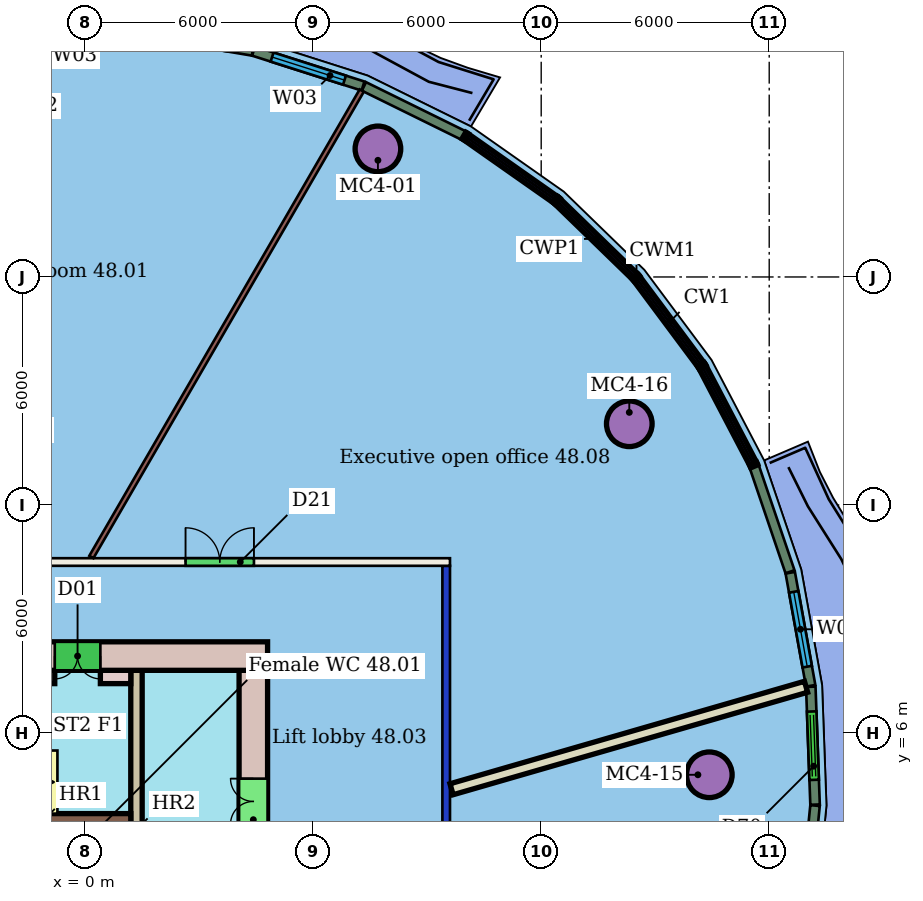
"""IFC4 building model, lengths in metres.
Left out: names, types, materials, properties, quantities, classifications, styles, units other than length and angle.
Written with IfcOpenShell. Run it as: python <this file> out.ifc"""

import sys

from ifc_helpers import new_model, si_unit, direction, frame, frame_2d, origin, origin_2d, place, context, subcontext, project, spatial, rectangle, hollow_circle, extrude, element, fill, save


model = new_model("IFC4")
c1 = context("Model", 3, precision=1e-05, world=origin(), true_north=direction((0.0, 1.0)))
c2 = subcontext(c1, "Body", "Model", "MODEL_VIEW")
j1 = project(units=[si_unit("LENGTHUNIT", "METRE"), si_unit("PLANEANGLEUNIT", "RADIAN")], contexts=[c1])
p1 = place(None, origin())
s1 = spatial("IfcSite", under=j1, at=p1, CompositionType="ELEMENT")
p2 = place(p1, origin())
s2 = spatial("IfcBuilding", under=s1, at=p2, CompositionType="ELEMENT")
p3 = place(p2, frame((0.0, 0.0, 199.3)))
s3 = spatial("IfcBuildingStorey", under=s2, at=p3, CompositionType="ELEMENT", Elevation=199.3)
for number, where, z_axis, x_axis in (
    (1, (7.704, 21.37, 0.0), (0.0, 0.0, 1.0), (1.0, 0.0, 0.0)),
    (2, (16.424, 4.901, 0.0), (0.0, 0.0, 1.0), (1.0, 0.0, 0.0)),
    (3, (14.318, 14.137, 0.0), (0.0, 0.0, 1.0), (1.0, 0.0, 0.0)),
):
    element("IfcColumn", number, at=place(p3, frame(where, z_axis=z_axis, x_axis=x_axis)), inside=s3, PredefinedType="COLUMN", context=c2, shape_type="SweptSolid", body=[
        extrude(hollow_circle(Radius=0.6, WallThickness=0.045, at=origin_2d()), origin(), (0.0, 0.0, 1.0), 3.45),
    ])
p4 = place(p3, frame((-21.6, 10.5, 0.0), z_axis=(0.0, 0.0, 1.0), x_axis=(1.0, 0.0, 0.0)))
e4 = element("IfcWall", 4, at=p4, inside=s3, PredefinedType="PARTITIONING", context=c2, shape_type="SweptSolid", body=[
    extrude(rectangle(XDim=31.2, YDim=0.2, at=frame_2d((15.6, 0.0))), origin(), (0.0, 0.0, 1.0), 3.45),
])
p5 = place(p4, frame((18.321, 0.0, 0.0)))
e5 = element("IfcOpeningElement", 5, at=p5, cuts=e4, PredefinedType="OPENING", context=c2, shape_type="SweptSolid", body=[
    extrude(rectangle(XDim=1.5, YDim=2.1, at=frame_2d((0.75, 1.05))), frame((0.0, 0.11, 0.0), z_axis=(0.0, -1.0, 0.0), x_axis=(1.0, 0.0, 0.0)), (0.0, 0.0, 1.0), 0.22),
])
p6 = place(p4, frame((8.688, 0.0, 0.0)))
e6 = element("IfcOpeningElement", 6, at=p6, cuts=e4, PredefinedType="OPENING", context=c2, shape_type="SweptSolid", body=[
    extrude(rectangle(XDim=1.8, YDim=2.4, at=frame_2d((0.9, 1.2))), frame((0.0, 0.11, 0.0), z_axis=(0.0, -1.0, 0.0), x_axis=(1.0, 0.0, 0.0)), (0.0, 0.0, 1.0), 0.22),
])
p7 = place(p4, frame((24.241, 0.0, 0.0)))
e7 = element("IfcOpeningElement", 7, at=p7, cuts=e4, PredefinedType="OPENING", context=c2, shape_type="SweptSolid", body=[
    extrude(rectangle(XDim=1.8, YDim=2.1, at=frame_2d((0.9, 1.05))), frame((0.0, 0.11, 0.0), z_axis=(0.0, -1.0, 0.0), x_axis=(1.0, 0.0, 0.0)), (0.0, 0.0, 1.0), 0.22),
])
p8 = place(p3, frame((9.5, 10.4, 0.0), z_axis=(0.0, 0.0, 1.0), x_axis=(0.0, -1.0, 0.0)))
e8 = element("IfcWall", 8, at=p8, inside=s3, PredefinedType="PARTITIONING", context=c2, shape_type="SweptSolid", body=[
    extrude(rectangle(XDim=20.8, YDim=0.2, at=frame_2d((10.4, 0.0))), origin(), (0.0, 0.0, 1.0), 3.05),
])
p9 = place(p8, frame((10.084, 0.0, 0.0)))
e9 = element("IfcOpeningElement", 9, at=p9, cuts=e8, PredefinedType="OPENING", context=c2, shape_type="SweptSolid", body=[
    extrude(rectangle(XDim=1.8, YDim=2.4, at=frame_2d((0.9, 1.2))), frame((0.0, 0.11, 0.0), z_axis=(0.0, -1.0, 0.0), x_axis=(1.0, 0.0, 0.0)), (0.0, 0.0, 1.0), 0.22),
])
p10 = place(p3, frame((7.277, 22.904, 0.0), z_axis=(0.0, 0.0, 1.0), x_axis=(-0.501519234172, -0.865146494968, 0.0)))
e10 = element("IfcWall", 10, at=p10, inside=s3, PredefinedType="PARTITIONING", context=c2, shape_type="SweptSolid", body=[
    extrude(rectangle(XDim=14.185, YDim=0.125, at=frame_2d((7.093, 0.0))), origin(), (0.0, 0.0, 1.0), 3.45),
])
p11 = place(p3, frame((18.969, 7.217, 0.0), z_axis=(0.0, 0.0, 1.0), x_axis=(-0.960680652431, -0.277655693342, 0.0)))
e11 = element("IfcWall", 11, at=p11, inside=s3, PredefinedType="PARTITIONING", context=c2, shape_type="SweptSolid", body=[
    extrude(rectangle(XDim=9.709, YDim=0.3, at=frame_2d((4.854, 0.0))), origin(), (0.0, 0.0, 1.0), 3.45),
])
p12 = place(p3, frame((9.951, 21.726, 0.0), z_axis=(0.0, 0.0, 1.0), x_axis=(-0.897141057634, 0.441744182426, 0.0)))
e12 = element("IfcWall", 12, at=p12, inside=s3, PredefinedType="SOLIDWALL", context=c2, shape_type="SweptSolid", body=[
    extrude(rectangle(XDim=2.915, YDim=0.25, at=frame_2d((1.458, 0.0))), origin(), (0.0, 0.0, 1.0), 3.1),
])
p13 = place(p3, frame((7.311, 23.024, 0.0), z_axis=(0.0, 0.0, 1.0), x_axis=(-0.952776106235, 0.303673659358, 0.0)))
e13 = element("IfcWall", 13, at=p13, inside=s3, PredefinedType="SOLIDWALL", context=c2, shape_type="SweptSolid", body=[
    extrude(rectangle(XDim=3.023, YDim=0.25, at=frame_2d((1.511, 0.0))), origin(), (0.0, 0.0, 1.0), 3.1),
])
p14 = place(p13, frame((0.511, 0.0, 0.9)))
e14 = element("IfcOpeningElement", 14, at=p14, cuts=e13, PredefinedType="OPENING", context=c2, shape_type="SweptSolid", body=[
    extrude(rectangle(XDim=2.0, YDim=2.1, at=frame_2d((1.0, 1.05))), frame((0.0, 0.135, 0.0), z_axis=(0.0, -1.0, 0.0), x_axis=(1.0, 0.0, 0.0)), (0.0, 0.0, 1.0), 0.27),
])
p15 = place(p3, frame((4.406, 23.948, 0.0), z_axis=(0.0, 0.0, 1.0), x_axis=(-0.986216863641, 0.165457843178, 0.0)))
e15 = element("IfcWall", 15, at=p15, inside=s3, PredefinedType="SOLIDWALL", context=c2, shape_type="SweptSolid", body=[
    extrude(rectangle(XDim=3.103, YDim=0.25, at=frame_2d((1.552, 0.0))), origin(), (0.0, 0.0, 1.0), 3.1),
])
p16 = place(p15, frame((0.652, 0.0, 0.0)))
e16 = element("IfcOpeningElement", 16, at=p16, cuts=e15, PredefinedType="OPENING", context=c2, shape_type="SweptSolid", body=[
    extrude(rectangle(XDim=1.8, YDim=2.4, at=frame_2d((0.9, 1.2))), frame((0.0, 0.135, 0.0), z_axis=(0.0, -1.0, 0.0), x_axis=(1.0, 0.0, 0.0)), (0.0, 0.0, 1.0), 0.27),
])
p17 = place(p3, frame((18.891, 0.917, 0.0), z_axis=(0.0, 0.0, 1.0), x_axis=(0.09873075653, 0.995114183255, 0.0)))
e17 = element("IfcWall", 17, at=p17, inside=s3, PredefinedType="SOLIDWALL", context=c2, shape_type="SweptSolid", body=[
    extrude(rectangle(XDim=3.19, YDim=0.25, at=frame_2d((1.595, 0.0))), origin(), (0.0, 0.0, 1.0), 3.1),
])
p18 = place(p17, frame((0.595, 0.0, 0.9)))
e18 = element("IfcOpeningElement", 18, at=p18, cuts=e17, PredefinedType="OPENING", context=c2, shape_type="SweptSolid", body=[
    extrude(rectangle(XDim=2.0, YDim=2.1, at=frame_2d((1.0, 1.05))), frame((0.0, 0.135, 0.0), z_axis=(0.0, -1.0, 0.0), x_axis=(1.0, 0.0, 0.0)), (0.0, 0.0, 1.0), 0.27),
])
p19 = place(p3, frame((19.207, 4.116, 0.0), z_axis=(0.0, 0.0, 1.0), x_axis=(-0.036429625248, 0.999336220901, 0.0)))
e19 = element("IfcWall", 19, at=p19, inside=s3, PredefinedType="SOLIDWALL", context=c2, shape_type="SweptSolid", body=[
    extrude(rectangle(XDim=3.103, YDim=0.25, at=frame_2d((1.551, 0.0))), origin(), (0.0, 0.0, 1.0), 3.1),
])
p20 = place(p19, frame((0.652, 0.0, 0.0)))
e20 = element("IfcOpeningElement", 20, at=p20, cuts=e19, PredefinedType="OPENING", context=c2, shape_type="SweptSolid", body=[
    extrude(rectangle(XDim=1.8, YDim=2.4, at=frame_2d((0.9, 1.2))), frame((0.0, 0.135, 0.0), z_axis=(0.0, -1.0, 0.0), x_axis=(1.0, 0.0, 0.0)), (0.0, 0.0, 1.0), 0.27),
])
p21 = place(p3, frame((19.091, 7.243, 0.0), z_axis=(0.0, 0.0, 1.0), x_axis=(-0.177755310082, 0.984074717558, 0.0)))
e21 = element("IfcWall", 21, at=p21, inside=s3, PredefinedType="SOLIDWALL", context=c2, shape_type="SweptSolid", body=[
    extrude(rectangle(XDim=3.023, YDim=0.25, at=frame_2d((1.511, 0.0))), origin(), (0.0, 0.0, 1.0), 3.1),
])
p22 = place(p21, frame((0.511, 0.0, 0.9)))
e22 = element("IfcOpeningElement", 22, at=p22, cuts=e21, PredefinedType="OPENING", context=c2, shape_type="SweptSolid", body=[
    extrude(rectangle(XDim=2.0, YDim=2.1, at=frame_2d((1.0, 1.05))), frame((0.0, 0.135, 0.0), z_axis=(0.0, -1.0, 0.0), x_axis=(1.0, 0.0, 0.0)), (0.0, 0.0, 1.0), 0.27),
])
p23 = place(p3, frame((18.547, 10.243, 0.0), z_axis=(0.0, 0.0, 1.0), x_axis=(-0.321901231571, 0.946773255385, 0.0)))
e23 = element("IfcWall", 23, at=p23, inside=s3, PredefinedType="SOLIDWALL", context=c2, shape_type="SweptSolid", body=[
    extrude(rectangle(XDim=2.915, YDim=0.25, at=frame_2d((1.457, 0.0))), origin(), (0.0, 0.0, 1.0), 3.1),
])
p24 = place(p3, frame((4.8, 8.025, 0.0), z_axis=(0.0, 0.0, 1.0), x_axis=(-1.0, 0.0, 0.0)))
e24 = element("IfcWall", 24, at=p24, inside=s3, PredefinedType="SHEAR", context=c2, shape_type="SweptSolid", body=[
    extrude(rectangle(XDim=10.8, YDim=0.75, at=frame_2d((5.4, 0.0))), origin(), (0.0, 0.0, 1.0), 3.3),
])
p25 = place(p24, frame((4.4, 0.0, 0.0)))
e25 = element("IfcOpeningElement", 25, at=p25, cuts=e24, PredefinedType="OPENING", context=c2, shape_type="SweptSolid", body=[
    extrude(rectangle(XDim=1.2, YDim=2.1, at=frame_2d((0.6, 1.05))), frame((0.0, 0.385, 0.0), z_axis=(0.0, -1.0, 0.0), x_axis=(1.0, 0.0, 0.0)), (0.0, 0.0, 1.0), 0.77),
])
p26 = place(p3, frame((4.425, -7.65, 0.0), z_axis=(0.0, 0.0, 1.0), x_axis=(0.0, 1.0, 0.0)))
e26 = element("IfcWall", 26, at=p26, inside=s3, PredefinedType="SHEAR", context=c2, shape_type="SweptSolid", body=[
    extrude(rectangle(XDim=15.3, YDim=0.75, at=frame_2d((7.65, 0.0))), origin(), (0.0, 0.0, 1.0), 3.3),
])
p27 = place(p26, frame((2.85, 0.0, 0.0)))
e27 = element("IfcOpeningElement", 27, at=p27, cuts=e26, PredefinedType="OPENING", context=c2, shape_type="SweptSolid", body=[
    extrude(rectangle(XDim=1.2, YDim=2.1, at=frame_2d((0.6, 1.05))), frame((0.0, 0.385, 0.0), z_axis=(0.0, -1.0, 0.0), x_axis=(1.0, 0.0, 0.0)), (0.0, 0.0, 1.0), 0.77),
])
p28 = place(p26, frame((11.25, 0.0, 0.0)))
e28 = element("IfcOpeningElement", 28, at=p28, cuts=e26, PredefinedType="OPENING", context=c2, shape_type="SweptSolid", body=[
    extrude(rectangle(XDim=1.2, YDim=2.1, at=frame_2d((0.6, 1.05))), frame((0.0, 0.385, 0.0), z_axis=(0.0, -1.0, 0.0), x_axis=(1.0, 0.0, 0.0)), (0.0, 0.0, 1.0), 0.77),
])
p29 = place(p3, frame((-6.0, 3.655, 0.0), z_axis=(0.0, 0.0, 1.0), x_axis=(1.0, 0.0, 0.0)))
e29 = element("IfcWall", 29, at=p29, inside=s3, PredefinedType="SHEAR", context=c2, shape_type="SweptSolid", body=[
    extrude(rectangle(XDim=7.2, YDim=0.45, at=frame_2d((3.6, 0.0))), origin(), (0.0, 0.0, 1.0), 3.3),
])
p30 = place(p3, frame((1.35, -7.65, 0.0), z_axis=(0.0, 0.0, 1.0), x_axis=(0.0, 1.0, 0.0)))
e30 = element("IfcWall", 30, at=p30, inside=s3, PredefinedType="SHEAR", context=c2, shape_type="SweptSolid", body=[
    extrude(rectangle(XDim=15.3, YDim=0.3, at=frame_2d((7.65, 0.0))), origin(), (0.0, 0.0, 1.0), 3.3),
])
p31 = place(p30, frame((1.56, 0.0, 0.0)))
e31 = element("IfcOpeningElement", 31, at=p31, cuts=e30, PredefinedType="OPENING", context=c2, shape_type="SweptSolid", body=[
    extrude(rectangle(XDim=1.0, YDim=2.1, at=frame_2d((0.5, 1.05))), frame((0.0, 0.16, 0.0), z_axis=(0.0, -1.0, 0.0), x_axis=(1.0, 0.0, 0.0)), (0.0, 0.0, 1.0), 0.32),
])
p32 = place(p30, frame((6.9, 0.0, 0.0)))
e32 = element("IfcOpeningElement", 32, at=p32, cuts=e30, PredefinedType="OPENING", context=c2, shape_type="SweptSolid", body=[
    extrude(rectangle(XDim=1.5, YDim=2.1, at=frame_2d((0.75, 1.05))), frame((0.0, 0.16, 0.0), z_axis=(0.0, -1.0, 0.0), x_axis=(1.0, 0.0, 0.0)), (0.0, 0.0, 1.0), 0.32),
])
p33 = place(p3, frame((-5.85, 7.475, 0.0), z_axis=(0.0, 0.0, 1.0), x_axis=(1.0, 0.0, 0.0)))
e33 = element("IfcWall", 33, at=p33, inside=s3, PredefinedType="SHEAR", context=c2, shape_type="SweptSolid", body=[
    extrude(rectangle(XDim=5.05, YDim=0.35, at=frame_2d((2.525, 0.0))), origin(), (0.0, 0.0, 1.0), 3.3),
])
p34 = place(p3, frame((0.4, 7.475, 0.0), z_axis=(0.0, 0.0, 1.0), x_axis=(1.0, 0.0, 0.0)))
e34 = element("IfcWall", 34, at=p34, inside=s3, PredefinedType="SHEAR", context=c2, shape_type="SweptSolid", body=[
    extrude(rectangle(XDim=0.8, YDim=0.35, at=frame_2d((0.4, 0.0))), origin(), (0.0, 0.0, 1.0), 3.3),
])
p35 = place(p7, origin())
e35 = element("IfcDoor", 35, at=p35, inside=s3, OperationType="DOUBLE_DOOR_SINGLE_SWING", PredefinedType="DOOR", context=c2, shape_type="SweptSolid", body=[
    extrude(rectangle(XDim=1.8, YDim=2.1, at=frame_2d((0.9, 1.05))), frame((0.0, 0.025, 0.0), z_axis=(0.0, -1.0, 0.0), x_axis=(1.0, 0.0, 0.0)), (0.0, 0.0, 1.0), 0.05),
])
fill(e7, e35)
p36 = place(p14, origin())
e36 = element("IfcWindow", 36, at=p36, inside=s3, PartitioningType="SINGLE_PANEL", PredefinedType="WINDOW", context=c2, shape_type="SweptSolid", body=[
    extrude(rectangle(XDim=2.0, YDim=2.1, at=frame_2d((1.0, 1.05))), frame((0.0, 0.03, 0.0), z_axis=(0.0, -1.0, 0.0), x_axis=(1.0, 0.0, 0.0)), (0.0, 0.0, 1.0), 0.06),
])
fill(e14, e36)
p37 = place(p20, origin())
e37 = element("IfcDoor", 37, at=p37, inside=s3, OperationType="DOUBLE_DOOR_SLIDING", PredefinedType="DOOR", context=c2, shape_type="SweptSolid", body=[
    extrude(rectangle(XDim=1.8, YDim=2.4, at=frame_2d((0.9, 1.2))), frame((0.0, 0.025, 0.0), z_axis=(0.0, -1.0, 0.0), x_axis=(1.0, 0.0, 0.0)), (0.0, 0.0, 1.0), 0.05),
])
fill(e20, e37)
p38 = place(p22, origin())
e38 = element("IfcWindow", 38, at=p38, inside=s3, PartitioningType="SINGLE_PANEL", PredefinedType="WINDOW", context=c2, shape_type="SweptSolid", body=[
    extrude(rectangle(XDim=2.0, YDim=2.1, at=frame_2d((1.0, 1.05))), frame((0.0, 0.03, 0.0), z_axis=(0.0, -1.0, 0.0), x_axis=(1.0, 0.0, 0.0)), (0.0, 0.0, 1.0), 0.06),
])
fill(e22, e38)
p39 = place(p25, origin())
e39 = element("IfcDoor", 39, at=p39, inside=s3, OperationType="DOUBLE_DOOR_SINGLE_SWING", PredefinedType="NOTDEFINED", context=c2, shape_type="SweptSolid", body=[
    extrude(rectangle(XDim=1.2, YDim=2.1, at=frame_2d((0.6, 1.05))), frame((0.0, 0.025, 0.0), z_axis=(0.0, -1.0, 0.0), x_axis=(1.0, 0.0, 0.0)), (0.0, 0.0, 1.0), 0.05),
])
fill(e25, e39)
p40 = place(p28, origin())
e40 = element("IfcDoor", 40, at=p40, inside=s3, OperationType="DOUBLE_DOOR_SINGLE_SWING", PredefinedType="NOTDEFINED", context=c2, shape_type="SweptSolid", body=[
    extrude(rectangle(XDim=1.2, YDim=2.1, at=frame_2d((0.6, 1.05))), frame((0.0, 0.025, 0.0), z_axis=(0.0, -1.0, 0.0), x_axis=(1.0, 0.0, 0.0)), (0.0, 0.0, 1.0), 0.05),
])
fill(e28, e40)
save(model, sys.argv[1])
